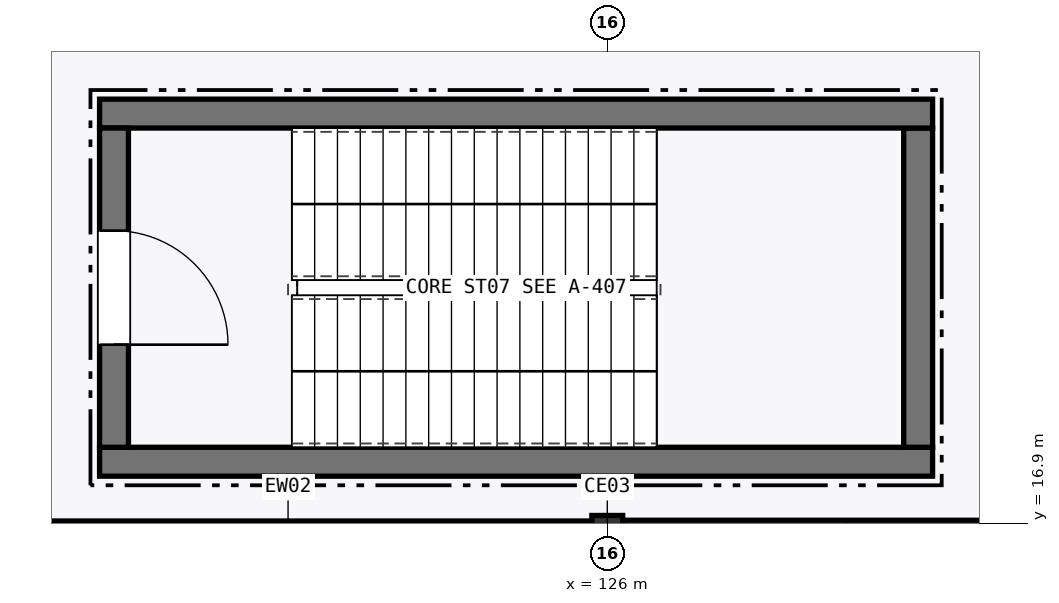
"""IFC4 building model, lengths in metres.
Left out: names, types, materials, properties, quantities, classifications, styles, units other than length and angle.
Written with IfcOpenShell. Run it as: python <this file> out.ifc"""

import sys

from ifc_helpers import new_model, si_unit, direction, frame, frame_2d, origin, origin_2d, place, context, subcontext, project, spatial, rectangle, hollow_circle, extrude, element, fill, save


model = new_model("IFC4")
c1 = context("Model", 3, precision=1e-05, world=origin(), true_north=direction((0.0, 1.0)))
c2 = subcontext(c1, "Body", "Model", "MODEL_VIEW")
j1 = project(units=[si_unit("LENGTHUNIT", "METRE"), si_unit("PLANEANGLEUNIT", "RADIAN")], contexts=[c1])
p1 = place(None, origin())
s1 = spatial("IfcSite", under=j1, at=p1, CompositionType="ELEMENT")
p2 = place(p1, origin())
s2 = spatial("IfcBuilding", under=s1, at=p2, CompositionType="ELEMENT")
p3 = place(p2, frame((0.0, 0.0, 16.5)))
s3 = spatial("IfcBuildingStorey", under=s2, at=p3, CompositionType="ELEMENT", Elevation=16.5)
p4 = place(p3, frame((126.0, 16.8, 0.0), z_axis=(0.0, 0.0, 1.0), x_axis=(1.0, 0.0, 0.0)))
e1 = element("IfcColumn", 1, at=p4, inside=s3, PredefinedType="COLUMN", context=c2, shape_type="SweptSolid", body=[
    extrude(hollow_circle(Radius=0.203, WallThickness=0.016, at=origin_2d()), origin(), (0.0, 0.0, 1.0), 5.1),
])
p5 = place(p3, frame((117.798, 16.8, 0.0), z_axis=(0.0, 0.0, 1.0), x_axis=(1.0, 0.0, 0.0)))
e2 = element("IfcWall", 2, at=p5, inside=s3, PredefinedType="STANDARD", context=c2, shape_type="SweptSolid", body=[
    extrude(rectangle(XDim=8.004, YDim=0.26, at=frame_2d((4.002, 0.0))), origin(), (0.0, 0.0, 1.0), 4.331),
])
p6 = place(p5, frame((3.102, 0.0, 0.95)))
e3 = element("IfcOpeningElement", 3, at=p6, cuts=e2, PredefinedType="OPENING", context=c2, shape_type="SweptSolid", body=[
    extrude(rectangle(XDim=1.8, YDim=2.4, at=frame_2d((0.9, 1.2))), frame((0.0, 0.14, 0.0), z_axis=(0.0, -1.0, 0.0), x_axis=(1.0, 0.0, 0.0)), (0.0, 0.0, 1.0), 0.28),
])
p7 = place(p3, frame((126.198, 16.8, 0.0), z_axis=(0.0, 0.0, 1.0), x_axis=(1.0, 0.0, 0.0)))
e4 = element("IfcWall", 4, at=p7, inside=s3, PredefinedType="STANDARD", context=c2, shape_type="SweptSolid", body=[
    extrude(rectangle(XDim=8.004, YDim=0.28, at=frame_2d((4.002, 0.0))), origin(), (0.0, 0.0, 1.0), 4.331),
])
p8 = place(p7, frame((2.952, 0.0, 0.95)))
e5 = element("IfcOpeningElement", 5, at=p8, cuts=e4, PredefinedType="OPENING", context=c2, shape_type="SweptSolid", body=[
    extrude(rectangle(XDim=2.1, YDim=2.4, at=frame_2d((1.05, 1.2))), frame((0.0, 0.15, 0.0), z_axis=(0.0, -1.0, 0.0), x_axis=(1.0, 0.0, 0.0)), (0.0, 0.0, 1.0), 0.3),
])
p9 = place(p3, frame((119.32, 17.71, 0.0), z_axis=(0.0, 0.0, 1.0), x_axis=(1.0, 0.0, 0.0)))
e6 = element("IfcWall", 6, at=p9, inside=s3, PredefinedType="SHEAR", context=c2, shape_type="SweptSolid", body=[
    extrude(rectangle(XDim=10.96, YDim=0.38, at=frame_2d((5.48, 0.0))), origin(), (0.0, 0.0, 1.0), 4.845),
])
p10 = place(p3, frame((130.09, 17.9, 0.0), z_axis=(0.0, 0.0, 1.0), x_axis=(0.0, 1.0, 0.0)))
e7 = element("IfcWall", 7, at=p10, inside=s3, PredefinedType="SHEAR", context=c2, shape_type="SweptSolid", body=[
    extrude(rectangle(XDim=4.2, YDim=0.38, at=frame_2d((2.1, 0.0))), origin(), (0.0, 0.0, 1.0), 4.845),
])
p11 = place(p3, frame((130.28, 22.29, 0.0), z_axis=(0.0, 0.0, 1.0), x_axis=(-1.0, 0.0, 0.0)))
e8 = element("IfcWall", 8, at=p11, inside=s3, PredefinedType="SHEAR", context=c2, shape_type="SweptSolid", body=[
    extrude(rectangle(XDim=10.96, YDim=0.38, at=frame_2d((5.48, 0.0))), origin(), (0.0, 0.0, 1.0), 4.845),
])
p12 = place(p3, frame((119.51, 22.1, 0.0), z_axis=(0.0, 0.0, 1.0), x_axis=(0.0, -1.0, 0.0)))
e9 = element("IfcWall", 9, at=p12, inside=s3, PredefinedType="SHEAR", context=c2, shape_type="SweptSolid", body=[
    extrude(rectangle(XDim=4.2, YDim=0.38, at=frame_2d((2.1, 0.0))), origin(), (0.0, 0.0, 1.0), 4.845),
])
p13 = place(p12, frame((1.35, 0.0, 0.0)))
e10 = element("IfcOpeningElement", 10, at=p13, cuts=e9, PredefinedType="OPENING", context=c2, shape_type="SweptSolid", body=[
    extrude(rectangle(XDim=1.5, YDim=2.15, at=frame_2d((0.75, 1.075))), frame((0.0, 0.2, 0.0), z_axis=(0.0, -1.0, 0.0), x_axis=(1.0, 0.0, 0.0)), (0.0, 0.0, 1.0), 0.4),
])
p14 = place(p13, origin())
e11 = element("IfcDoor", 11, at=p14, inside=s3, OperationType="SINGLE_SWING_RIGHT", PredefinedType="DOOR", context=c2, shape_type="SweptSolid", body=[
    extrude(rectangle(XDim=1.5, YDim=2.15, at=frame_2d((0.75, 1.075))), frame((0.0, 0.025, 0.0), z_axis=(0.0, -1.0, 0.0), x_axis=(1.0, 0.0, 0.0)), (0.0, 0.0, 1.0), 0.05),
])
fill(e10, e11)
save(model, sys.argv[1])
